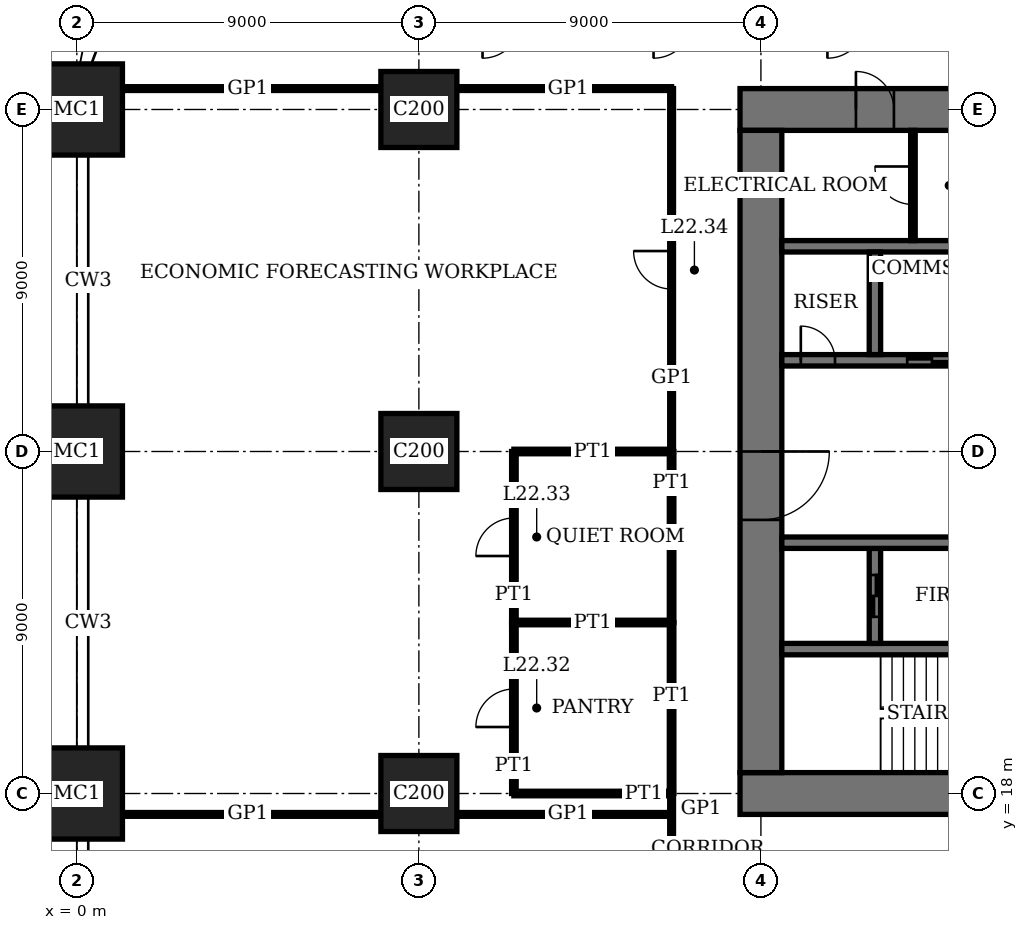
"""IFC4 building model, lengths in metres.
Left out: names, types, materials, properties, quantities, classifications, styles, units other than length and angle.
Written with IfcOpenShell. Run it as: python <this file> out.ifc"""

import sys

from ifc_helpers import new_model, si_unit, direction, frame, frame_2d, origin, origin_2d, place, context, subcontext, project, spatial, rectangle, extrude, element, fill, save


model = new_model("IFC4")
c1 = context("Model", 3, precision=1e-05, world=origin(), true_north=direction((0.0, 1.0)))
c2 = subcontext(c1, "Body", "Model", "MODEL_VIEW")
j1 = project(units=[si_unit("LENGTHUNIT", "METRE"), si_unit("PLANEANGLEUNIT", "RADIAN")], contexts=[c1])
p1 = place(None, origin())
s1 = spatial("IfcSite", under=j1, at=p1, CompositionType="ELEMENT")
p2 = place(p1, origin())
s2 = spatial("IfcBuilding", under=s1, at=p2, CompositionType="ELEMENT")
p3 = place(p2, frame((0.0, 0.0, 93.0)))
s3 = spatial("IfcBuildingStorey", under=s2, at=p3, CompositionType="ELEMENT", Elevation=93.0)
for number, where, z_axis, x_axis in (
    (1, (0.0, 18.0, 0.0), (0.0, 0.0, 1.0), (1.0, 0.0, 0.0)),
    (2, (0.0, 27.0, 0.0), (0.0, 0.0, 1.0), (1.0, 0.0, 0.0)),
    (3, (0.0, 36.0, 0.0), (0.0, 0.0, 1.0), (1.0, 0.0, 0.0)),
):
    element("IfcColumn", number, at=place(p3, frame(where, z_axis=z_axis, x_axis=x_axis)), inside=s3, PredefinedType="COLUMN", context=c2, shape_type="SweptSolid", body=[
        extrude(rectangle(XDim=2.4, YDim=2.4, at=origin_2d()), origin(), (0.0, 0.0, 1.0), 4.0),
    ])
for number, where, z_axis, x_axis in (
    (4, (9.0, 18.0, 0.0), (0.0, 0.0, 1.0), (1.0, 0.0, 0.0)),
    (5, (9.0, 27.0, 0.0), (0.0, 0.0, 1.0), (1.0, 0.0, 0.0)),
    (6, (9.0, 36.0, 0.0), (0.0, 0.0, 1.0), (1.0, 0.0, 0.0)),
):
    element("IfcColumn", number, at=place(p3, frame(where, z_axis=z_axis, x_axis=x_axis)), inside=s3, PredefinedType="COLUMN", context=c2, shape_type="SweptSolid", body=[
        extrude(rectangle(XDim=2.0, YDim=2.0, at=origin_2d()), origin(), (0.0, 0.0, 1.0), 4.0),
    ])
p4 = place(p3, frame((17.45, 18.0, 0.0), z_axis=(0.0, 0.0, 1.0), x_axis=(1.0, 0.0, 0.0)))
e7 = element("IfcWall", 7, at=p4, inside=s3, PredefinedType="SHEAR", context=c2, shape_type="SweptSolid", body=[
    extrude(rectangle(XDim=28.1, YDim=1.1, at=frame_2d((14.05, 0.0))), origin(), (0.0, 0.0, 1.0), 4.0),
])
p5 = place(p4, frame((11.55, 0.0, 0.0)))
e8 = element("IfcOpeningElement", 8, at=p5, cuts=e7, PredefinedType="OPENING", context=c2, shape_type="SweptSolid", body=[
    extrude(rectangle(XDim=1.0, YDim=2.4, at=frame_2d((0.5, 1.2))), frame((0.0, 0.56, 0.0), z_axis=(0.0, -1.0, 0.0), x_axis=(1.0, 0.0, 0.0)), (0.0, 0.0, 1.0), 1.12),
])
p6 = place(p4, frame((16.55, 0.0, 0.0)))
e9 = element("IfcOpeningElement", 9, at=p6, cuts=e7, PredefinedType="OPENING", context=c2, shape_type="SweptSolid", body=[
    extrude(rectangle(XDim=1.0, YDim=2.4, at=frame_2d((0.5, 1.2))), frame((0.0, 0.56, 0.0), z_axis=(0.0, -1.0, 0.0), x_axis=(1.0, 0.0, 0.0)), (0.0, 0.0, 1.0), 1.12),
])
p7 = place(p4, frame((20.0, 0.0, 0.0)))
e10 = element("IfcOpeningElement", 10, at=p7, cuts=e7, PredefinedType="OPENING", context=c2, shape_type="SweptSolid", body=[
    extrude(rectangle(XDim=1.1, YDim=2.4, at=frame_2d((0.55, 1.2))), frame((0.0, 0.56, 0.0), z_axis=(0.0, -1.0, 0.0), x_axis=(1.0, 0.0, 0.0)), (0.0, 0.0, 1.0), 1.12),
])
p8 = place(p4, frame((24.05, 0.0, 0.0)))
e11 = element("IfcOpeningElement", 11, at=p8, cuts=e7, PredefinedType="OPENING", context=c2, shape_type="SweptSolid", body=[
    extrude(rectangle(XDim=1.0, YDim=2.4, at=frame_2d((0.5, 1.2))), frame((0.0, 0.56, 0.0), z_axis=(0.0, -1.0, 0.0), x_axis=(1.0, 0.0, 0.0)), (0.0, 0.0, 1.0), 1.12),
])
p9 = place(p3, frame((45.55, 36.0, 0.0), z_axis=(0.0, 0.0, 1.0), x_axis=(-1.0, 0.0, 0.0)))
e12 = element("IfcWall", 12, at=p9, inside=s3, PredefinedType="SHEAR", context=c2, shape_type="SweptSolid", body=[
    extrude(rectangle(XDim=28.1, YDim=1.1, at=frame_2d((14.05, 0.0))), origin(), (0.0, 0.0, 1.0), 4.0),
])
p10 = place(p9, frame((11.55, 0.0, 0.0)))
e13 = element("IfcOpeningElement", 13, at=p10, cuts=e12, PredefinedType="OPENING", context=c2, shape_type="SweptSolid", body=[
    extrude(rectangle(XDim=1.0, YDim=2.4, at=frame_2d((0.5, 1.2))), frame((0.0, 0.56, 0.0), z_axis=(0.0, -1.0, 0.0), x_axis=(1.0, 0.0, 0.0)), (0.0, 0.0, 1.0), 1.12),
])
p11 = place(p9, frame((16.55, 0.0, 0.0)))
e14 = element("IfcOpeningElement", 14, at=p11, cuts=e12, PredefinedType="OPENING", context=c2, shape_type="SweptSolid", body=[
    extrude(rectangle(XDim=1.0, YDim=2.4, at=frame_2d((0.5, 1.2))), frame((0.0, 0.56, 0.0), z_axis=(0.0, -1.0, 0.0), x_axis=(1.0, 0.0, 0.0)), (0.0, 0.0, 1.0), 1.12),
])
p12 = place(p9, frame((20.0, 0.0, 0.0)))
e15 = element("IfcOpeningElement", 15, at=p12, cuts=e12, PredefinedType="OPENING", context=c2, shape_type="SweptSolid", body=[
    extrude(rectangle(XDim=1.1, YDim=2.4, at=frame_2d((0.55, 1.2))), frame((0.0, 0.56, 0.0), z_axis=(0.0, -1.0, 0.0), x_axis=(1.0, 0.0, 0.0)), (0.0, 0.0, 1.0), 1.12),
])
p13 = place(p9, frame((24.05, 0.0, 0.0)))
e16 = element("IfcOpeningElement", 16, at=p13, cuts=e12, PredefinedType="OPENING", context=c2, shape_type="SweptSolid", body=[
    extrude(rectangle(XDim=1.0, YDim=2.4, at=frame_2d((0.5, 1.2))), frame((0.0, 0.56, 0.0), z_axis=(0.0, -1.0, 0.0), x_axis=(1.0, 0.0, 0.0)), (0.0, 0.0, 1.0), 1.12),
])
p14 = place(p3, frame((18.0, 35.45, 0.0), z_axis=(0.0, 0.0, 1.0), x_axis=(0.0, -1.0, 0.0)))
e17 = element("IfcWall", 17, at=p14, inside=s3, PredefinedType="SHEAR", context=c2, shape_type="SweptSolid", body=[
    extrude(rectangle(XDim=16.9, YDim=1.1, at=frame_2d((8.45, 0.0))), origin(), (0.0, 0.0, 1.0), 4.0),
])
p15 = place(p14, frame((8.45, 0.0, 0.0)))
e18 = element("IfcOpeningElement", 18, at=p15, cuts=e17, PredefinedType="OPENING", context=c2, shape_type="SweptSolid", body=[
    extrude(rectangle(XDim=1.8, YDim=2.4, at=frame_2d((0.9, 1.2))), frame((0.0, 0.56, 0.0), z_axis=(0.0, -1.0, 0.0), x_axis=(1.0, 0.0, 0.0)), (0.0, 0.0, 1.0), 1.12),
])
p16 = place(p3, frame((18.55, 21.8, 0.0), z_axis=(0.0, 0.0, 1.0), x_axis=(1.0, 0.0, 0.0)))
e19 = element("IfcWall", 19, at=p16, inside=s3, PredefinedType="SHEAR", context=c2, shape_type="SweptSolid", body=[
    extrude(rectangle(XDim=8.3, YDim=0.3, at=frame_2d((4.15, 0.0))), origin(), (0.0, 0.0, 1.0), 4.0),
])
p17 = place(p16, frame((6.85, 0.0, 0.0)))
e20 = element("IfcOpeningElement", 20, at=p17, cuts=e19, PredefinedType="OPENING", context=c2, shape_type="SweptSolid", body=[
    extrude(rectangle(XDim=1.0, YDim=2.4, at=frame_2d((0.5, 1.2))), frame((0.0, 0.16, 0.0), z_axis=(0.0, -1.0, 0.0), x_axis=(1.0, 0.0, 0.0)), (0.0, 0.0, 1.0), 0.32),
])
p18 = place(p3, frame((21.0, 21.95, 0.0), z_axis=(0.0, 0.0, 1.0), x_axis=(0.0, 1.0, 0.0)))
e21 = element("IfcWall", 21, at=p18, inside=s3, PredefinedType="SHEAR", context=c2, shape_type="SweptSolid", body=[
    extrude(rectangle(XDim=2.5, YDim=0.3, at=frame_2d((1.25, 0.0))), origin(), (0.0, 0.0, 1.0), 4.0),
])
p19 = place(p18, frame((0.7, 0.0, 0.0)))
e22 = element("IfcOpeningElement", 22, at=p19, cuts=e21, PredefinedType="OPENING", context=c2, shape_type="SweptSolid", body=[
    extrude(rectangle(XDim=1.1, YDim=2.4, at=frame_2d((0.55, 1.2))), frame((0.0, 0.16, 0.0), z_axis=(0.0, -1.0, 0.0), x_axis=(1.0, 0.0, 0.0)), (0.0, 0.0, 1.0), 0.32),
])
p20 = place(p3, frame((18.55, 24.6, 0.0), z_axis=(0.0, 0.0, 1.0), x_axis=(1.0, 0.0, 0.0)))
e23 = element("IfcWall", 23, at=p20, inside=s3, PredefinedType="SHEAR", context=c2, shape_type="SweptSolid", body=[
    extrude(rectangle(XDim=25.9, YDim=0.3, at=frame_2d((12.95, 0.0))), origin(), (0.0, 0.0, 1.0), 4.0),
])
p21 = place(p20, frame((4.95, 0.0, 0.0)))
e24 = element("IfcOpeningElement", 24, at=p21, cuts=e23, PredefinedType="OPENING", context=c2, shape_type="SweptSolid", body=[
    extrude(rectangle(XDim=1.0, YDim=2.4, at=frame_2d((0.5, 1.2))), frame((0.0, 0.16, 0.0), z_axis=(0.0, -1.0, 0.0), x_axis=(1.0, 0.0, 0.0)), (0.0, 0.0, 1.0), 0.32),
])
p22 = place(p20, frame((24.5, 0.0, 0.0)))
e25 = element("IfcOpeningElement", 25, at=p22, cuts=e23, PredefinedType="OPENING", context=c2, shape_type="SweptSolid", body=[
    extrude(rectangle(XDim=0.9, YDim=2.1, at=frame_2d((0.45, 1.05))), frame((0.0, 0.16, 0.0), z_axis=(0.0, -1.0, 0.0), x_axis=(1.0, 0.0, 0.0)), (0.0, 0.0, 1.0), 0.32),
])
p23 = place(p20, frame((21.3, 0.0, 0.0)))
e26 = element("IfcOpeningElement", 26, at=p23, cuts=e23, PredefinedType="OPENING", context=c2, shape_type="SweptSolid", body=[
    extrude(rectangle(XDim=1.3, YDim=2.4, at=frame_2d((0.65, 1.2))), frame((0.0, 0.16, 0.0), z_axis=(0.0, -1.0, 0.0), x_axis=(1.0, 0.0, 0.0)), (0.0, 0.0, 1.0), 0.32),
])
p24 = place(p3, frame((18.55, 29.4, 0.0), z_axis=(0.0, 0.0, 1.0), x_axis=(1.0, 0.0, 0.0)))
e27 = element("IfcWall", 27, at=p24, inside=s3, PredefinedType="SHEAR", context=c2, shape_type="SweptSolid", body=[
    extrude(rectangle(XDim=25.9, YDim=0.3, at=frame_2d((12.95, 0.0))), origin(), (0.0, 0.0, 1.0), 4.0),
])
p25 = place(p24, frame((19.95, 0.0, 0.0)))
e28 = element("IfcOpeningElement", 28, at=p25, cuts=e27, PredefinedType="OPENING", context=c2, shape_type="SweptSolid", body=[
    extrude(rectangle(XDim=1.0, YDim=2.4, at=frame_2d((0.5, 1.2))), frame((0.0, 0.16, 0.0), z_axis=(0.0, -1.0, 0.0), x_axis=(1.0, 0.0, 0.0)), (0.0, 0.0, 1.0), 0.32),
])
p26 = place(p24, frame((0.5, 0.0, 0.0)))
e29 = element("IfcOpeningElement", 29, at=p26, cuts=e27, PredefinedType="OPENING", context=c2, shape_type="SweptSolid", body=[
    extrude(rectangle(XDim=0.9, YDim=2.1, at=frame_2d((0.45, 1.05))), frame((0.0, 0.16, 0.0), z_axis=(0.0, -1.0, 0.0), x_axis=(1.0, 0.0, 0.0)), (0.0, 0.0, 1.0), 0.32),
])
p27 = place(p24, frame((15.4, 0.0, 0.0)))
e30 = element("IfcOpeningElement", 30, at=p27, cuts=e27, PredefinedType="OPENING", context=c2, shape_type="SweptSolid", body=[
    extrude(rectangle(XDim=1.1, YDim=2.4, at=frame_2d((0.55, 1.2))), frame((0.0, 0.16, 0.0), z_axis=(0.0, -1.0, 0.0), x_axis=(1.0, 0.0, 0.0)), (0.0, 0.0, 1.0), 0.32),
])
p28 = place(p24, frame((12.4, 0.0, 0.0)))
e31 = element("IfcOpeningElement", 31, at=p28, cuts=e27, PredefinedType="OPENING", context=c2, shape_type="SweptSolid", body=[
    extrude(rectangle(XDim=1.1, YDim=2.4, at=frame_2d((0.55, 1.2))), frame((0.0, 0.16, 0.0), z_axis=(0.0, -1.0, 0.0), x_axis=(1.0, 0.0, 0.0)), (0.0, 0.0, 1.0), 0.32),
])
p29 = place(p24, frame((3.3, 0.0, 0.0)))
e32 = element("IfcOpeningElement", 32, at=p29, cuts=e27, PredefinedType="OPENING", context=c2, shape_type="SweptSolid", body=[
    extrude(rectangle(XDim=1.3, YDim=2.4, at=frame_2d((0.65, 1.2))), frame((0.0, 0.16, 0.0), z_axis=(0.0, -1.0, 0.0), x_axis=(1.0, 0.0, 0.0)), (0.0, 0.0, 1.0), 0.32),
])
p30 = place(p3, frame((18.55, 32.4, 0.0), z_axis=(0.0, 0.0, 1.0), x_axis=(1.0, 0.0, 0.0)))
e33 = element("IfcWall", 33, at=p30, inside=s3, PredefinedType="SHEAR", context=c2, shape_type="SweptSolid", body=[
    extrude(rectangle(XDim=17.3, YDim=0.3, at=frame_2d((8.65, 0.0))), origin(), (0.0, 0.0, 1.0), 4.0),
])
p31 = place(p3, frame((21.0, 29.55, 0.0), z_axis=(0.0, 0.0, 1.0), x_axis=(0.0, 1.0, 0.0)))
e34 = element("IfcWall", 34, at=p31, inside=s3, PredefinedType="SHEAR", context=c2, shape_type="SweptSolid", body=[
    extrude(rectangle(XDim=2.7, YDim=0.3, at=frame_2d((1.35, 0.0))), origin(), (0.0, 0.0, 1.0), 4.0),
])
p32 = place(p3, frame((1.2, 17.45, 0.0), z_axis=(0.0, 0.0, 1.0), x_axis=(1.0, 0.0, 0.0)))
e35 = element("IfcWall", 35, at=p32, inside=s3, PredefinedType="PARTITIONING", context=c2, shape_type="SweptSolid", body=[
    extrude(rectangle(XDim=6.8, YDim=0.1, at=frame_2d((3.4, 0.0))), origin(), (0.0, 0.0, 1.0), 3.75),
])
p33 = place(p3, frame((10.0, 17.45, 0.0), z_axis=(0.0, 0.0, 1.0), x_axis=(1.0, 0.0, 0.0)))
e36 = element("IfcWall", 36, at=p33, inside=s3, PredefinedType="PARTITIONING", context=c2, shape_type="SweptSolid", body=[
    extrude(rectangle(XDim=5.65, YDim=0.1, at=frame_2d((2.825, 0.0))), origin(), (0.0, 0.0, 1.0), 3.75),
])
p34 = place(p3, frame((11.5, 18.0, 0.0), z_axis=(0.0, 0.0, 1.0), x_axis=(1.0, 0.0, 0.0)))
e37 = element("IfcWall", 37, at=p34, inside=s3, PredefinedType="PARTITIONING", context=c2, shape_type="SweptSolid", body=[
    extrude(rectangle(XDim=4.15, YDim=0.12, at=frame_2d((2.075, 0.0))), origin(), (0.0, 0.0, 1.0), 3.05),
])
p35 = place(p3, frame((11.5, 22.5, 0.0), z_axis=(0.0, 0.0, 1.0), x_axis=(1.0, 0.0, 0.0)))
e38 = element("IfcWall", 38, at=p35, inside=s3, PredefinedType="PARTITIONING", context=c2, shape_type="SweptSolid", body=[
    extrude(rectangle(XDim=4.15, YDim=0.12, at=frame_2d((2.075, 0.0))), origin(), (0.0, 0.0, 1.0), 3.1),
])
p36 = place(p3, frame((11.5, 27.0, 0.0), z_axis=(0.0, 0.0, 1.0), x_axis=(1.0, 0.0, 0.0)))
e39 = element("IfcWall", 39, at=p36, inside=s3, PredefinedType="PARTITIONING", context=c2, shape_type="SweptSolid", body=[
    extrude(rectangle(XDim=4.15, YDim=0.12, at=frame_2d((2.075, 0.0))), origin(), (0.0, 0.0, 1.0), 3.05),
])
p37 = place(p3, frame((1.2, 36.55, 0.0), z_axis=(0.0, 0.0, 1.0), x_axis=(1.0, 0.0, 0.0)))
e40 = element("IfcWall", 40, at=p37, inside=s3, PredefinedType="PARTITIONING", context=c2, shape_type="SweptSolid", body=[
    extrude(rectangle(XDim=6.8, YDim=0.1, at=frame_2d((3.4, 0.0))), origin(), (0.0, 0.0, 1.0), 3.75),
])
p38 = place(p3, frame((10.0, 36.55, 0.0), z_axis=(0.0, 0.0, 1.0), x_axis=(1.0, 0.0, 0.0)))
e41 = element("IfcWall", 41, at=p38, inside=s3, PredefinedType="PARTITIONING", context=c2, shape_type="SweptSolid", body=[
    extrude(rectangle(XDim=5.65, YDim=0.1, at=frame_2d((2.825, 0.0))), origin(), (0.0, 0.0, 1.0), 3.75),
])
p39 = place(p3, frame((11.5, 18.0, 0.0), z_axis=(0.0, 0.0, 1.0), x_axis=(0.0, 1.0, 0.0)))
e42 = element("IfcWall", 42, at=p39, inside=s3, PredefinedType="PARTITIONING", context=c2, shape_type="SweptSolid", body=[
    extrude(rectangle(XDim=4.5, YDim=0.12, at=frame_2d((2.25, 0.0))), origin(), (0.0, 0.0, 1.0), 3.75),
])
p40 = place(p39, frame((1.75, 0.0, 0.0)))
e43 = element("IfcOpeningElement", 43, at=p40, cuts=e42, PredefinedType="OPENING", context=c2, shape_type="SweptSolid", body=[
    extrude(rectangle(XDim=1.0, YDim=2.4, at=frame_2d((0.5, 1.2))), frame((0.0, 0.07, 0.0), z_axis=(0.0, -1.0, 0.0), x_axis=(1.0, 0.0, 0.0)), (0.0, 0.0, 1.0), 0.14),
])
p41 = place(p3, frame((11.5, 22.5, 0.0), z_axis=(0.0, 0.0, 1.0), x_axis=(0.0, 1.0, 0.0)))
e44 = element("IfcWall", 44, at=p41, inside=s3, PredefinedType="PARTITIONING", context=c2, shape_type="SweptSolid", body=[
    extrude(rectangle(XDim=4.5, YDim=0.12, at=frame_2d((2.25, 0.0))), origin(), (0.0, 0.0, 1.0), 3.75),
])
p42 = place(p41, frame((1.75, 0.0, 0.0)))
e45 = element("IfcOpeningElement", 45, at=p42, cuts=e44, PredefinedType="OPENING", context=c2, shape_type="SweptSolid", body=[
    extrude(rectangle(XDim=1.0, YDim=2.4, at=frame_2d((0.5, 1.2))), frame((0.0, 0.07, 0.0), z_axis=(0.0, -1.0, 0.0), x_axis=(1.0, 0.0, 0.0)), (0.0, 0.0, 1.0), 0.14),
])
for number, where, z_axis, x_axis in (
    (46, (15.65, 18.0, 0.0), (0.0, 0.0, 1.0), (0.0, 1.0, 0.0)),
    (47, (15.65, 22.5, 0.0), (0.0, 0.0, 1.0), (0.0, 1.0, 0.0)),
):
    element("IfcWall", number, at=place(p3, frame(where, z_axis=z_axis, x_axis=x_axis)), inside=s3, PredefinedType="PARTITIONING", context=c2, shape_type="SweptSolid", body=[
        extrude(rectangle(XDim=4.5, YDim=0.12, at=frame_2d((2.25, 0.0))), origin(), (0.0, 0.0, 1.0), 3.75),
    ])
p43 = place(p3, frame((15.65, 15.65, 0.0), z_axis=(0.0, 0.0, 1.0), x_axis=(0.0, 1.0, 0.0)))
e48 = element("IfcWall", 48, at=p43, inside=s3, PredefinedType="PARTITIONING", context=c2, shape_type="SweptSolid", body=[
    extrude(rectangle(XDim=2.35, YDim=0.1, at=frame_2d((1.175, 0.0))), origin(), (0.0, 0.0, 1.0), 3.75),
])
p44 = place(p3, frame((15.65, 27.0, 0.0), z_axis=(0.0, 0.0, 1.0), x_axis=(0.0, 1.0, 0.0)))
e49 = element("IfcWall", 49, at=p44, inside=s3, PredefinedType="PARTITIONING", context=c2, shape_type="SweptSolid", body=[
    extrude(rectangle(XDim=9.55, YDim=0.1, at=frame_2d((4.775, 0.0))), origin(), (0.0, 0.0, 1.0), 3.75),
])
p45 = place(p44, frame((4.275, 0.0, 0.0)))
e50 = element("IfcOpeningElement", 50, at=p45, cuts=e49, PredefinedType="OPENING", context=c2, shape_type="SweptSolid", body=[
    extrude(rectangle(XDim=1.0, YDim=2.4, at=frame_2d((0.5, 1.2))), frame((0.0, 0.06, 0.0), z_axis=(0.0, -1.0, 0.0), x_axis=(1.0, 0.0, 0.0)), (0.0, 0.0, 1.0), 0.12),
])
p46 = place(p3, frame((22.0, 32.55, 0.0), z_axis=(0.0, 0.0, 1.0), x_axis=(0.0, 1.0, 0.0)))
e51 = element("IfcWall", 51, at=p46, inside=s3, PredefinedType="PARTITIONING", context=c2, shape_type="SweptSolid", body=[
    extrude(rectangle(XDim=2.9, YDim=0.12, at=frame_2d((1.45, 0.0))), origin(), (0.0, 0.0, 1.0), 3.75),
])
p47 = place(p46, frame((0.95, 0.0, 0.0)))
e52 = element("IfcOpeningElement", 52, at=p47, cuts=e51, PredefinedType="OPENING", context=c2, shape_type="SweptSolid", body=[
    extrude(rectangle(XDim=1.0, YDim=2.4, at=frame_2d((0.5, 1.2))), frame((0.0, 0.07, 0.0), z_axis=(0.0, -1.0, 0.0), x_axis=(1.0, 0.0, 0.0)), (0.0, 0.0, 1.0), 0.14),
])
p48 = place(p15, origin())
e53 = element("IfcDoor", 53, at=p48, inside=s3, OperationType="DOUBLE_DOOR_DOUBLE_SWING", PredefinedType="DOOR", context=c2, shape_type="SweptSolid", body=[
    extrude(rectangle(XDim=1.8, YDim=2.4, at=frame_2d((0.9, 1.2))), frame((0.0, 0.03, 0.0), z_axis=(0.0, -1.0, 0.0), x_axis=(1.0, 0.0, 0.0)), (0.0, 0.0, 1.0), 0.06),
    extrude(rectangle(XDim=0.04, YDim=2.4, at=frame_2d((0.02, 1.2))), frame((0.0, 0.55, 0.0), z_axis=(0.0, -1.0, 0.0), x_axis=(1.0, 0.0, 0.0)), (0.0, 0.0, 1.0), 1.1),
    extrude(rectangle(XDim=0.04, YDim=2.4, at=frame_2d((1.78, 1.2))), frame((0.0, 0.55, 0.0), z_axis=(0.0, -1.0, 0.0), x_axis=(1.0, 0.0, 0.0)), (0.0, 0.0, 1.0), 1.1),
    extrude(rectangle(XDim=1.8, YDim=0.04, at=frame_2d((0.9, 2.38))), frame((0.0, 0.55, 0.0), z_axis=(0.0, -1.0, 0.0), x_axis=(1.0, 0.0, 0.0)), (0.0, 0.0, 1.0), 1.1),
])
fill(e18, e53)
p49 = place(p13, origin())
e54 = element("IfcDoor", 54, at=p49, inside=s3, OperationType="SINGLE_SWING_RIGHT", PredefinedType="DOOR", context=c2, shape_type="SweptSolid", body=[
    extrude(rectangle(XDim=1.0, YDim=2.4, at=frame_2d((0.5, 1.2))), frame((0.0, 0.025, 0.0), z_axis=(0.0, -1.0, 0.0), x_axis=(1.0, 0.0, 0.0)), (0.0, 0.0, 1.0), 0.05),
    extrude(rectangle(XDim=0.04, YDim=2.4, at=frame_2d((0.02, 1.2))), frame((0.0, 0.4, 0.0), z_axis=(0.0, -1.0, 0.0), x_axis=(1.0, 0.0, 0.0)), (0.0, 0.0, 1.0), 0.8),
    extrude(rectangle(XDim=0.04, YDim=2.4, at=frame_2d((0.98, 1.2))), frame((0.0, 0.4, 0.0), z_axis=(0.0, -1.0, 0.0), x_axis=(1.0, 0.0, 0.0)), (0.0, 0.0, 1.0), 0.8),
    extrude(rectangle(XDim=1.0, YDim=0.04, at=frame_2d((0.5, 2.38))), frame((0.0, 0.4, 0.0), z_axis=(0.0, -1.0, 0.0), x_axis=(1.0, 0.0, 0.0)), (0.0, 0.0, 1.0), 0.8),
])
fill(e16, e54)
p50 = place(p26, origin())
e55 = element("IfcDoor", 55, at=p50, inside=s3, OperationType="SINGLE_SWING_RIGHT", PredefinedType="DOOR", context=c2, shape_type="SweptSolid", body=[
    extrude(rectangle(XDim=0.9, YDim=2.1, at=frame_2d((0.45, 1.05))), frame((0.0, 0.03, 0.0), z_axis=(0.0, -1.0, 0.0), x_axis=(1.0, 0.0, 0.0)), (0.0, 0.0, 1.0), 0.06),
])
fill(e29, e55)
p51 = place(p40, origin())
e56 = element("IfcDoor", 56, at=p51, inside=s3, OperationType="SINGLE_SWING_RIGHT", PredefinedType="DOOR", context=c2, shape_type="SweptSolid", body=[
    extrude(rectangle(XDim=1.0, YDim=2.4, at=frame_2d((0.5, 1.2))), frame((0.0, 0.025, 0.0), z_axis=(0.0, -1.0, 0.0), x_axis=(1.0, 0.0, 0.0)), (0.0, 0.0, 1.0), 0.05),
])
fill(e43, e56)
p52 = place(p42, origin())
e57 = element("IfcDoor", 57, at=p52, inside=s3, OperationType="SINGLE_SWING_RIGHT", PredefinedType="DOOR", context=c2, shape_type="SweptSolid", body=[
    extrude(rectangle(XDim=1.0, YDim=2.4, at=frame_2d((0.5, 1.2))), frame((0.0, 0.025, 0.0), z_axis=(0.0, -1.0, 0.0), x_axis=(1.0, 0.0, 0.0)), (0.0, 0.0, 1.0), 0.05),
])
fill(e45, e57)
p53 = place(p45, origin())
e58 = element("IfcDoor", 58, at=p53, inside=s3, OperationType="SINGLE_SWING_LEFT", PredefinedType="DOOR", context=c2, shape_type="SweptSolid", body=[
    extrude(rectangle(XDim=1.0, YDim=2.4, at=frame_2d((0.5, 1.2))), frame((0.0, 0.02, 0.0), z_axis=(0.0, -1.0, 0.0), x_axis=(1.0, 0.0, 0.0)), (0.0, 0.0, 1.0), 0.04),
])
fill(e50, e58)
p54 = place(p47, origin())
e59 = element("IfcDoor", 59, at=p54, inside=s3, OperationType="SINGLE_SWING_LEFT", PredefinedType="DOOR", context=c2, shape_type="SweptSolid", body=[
    extrude(rectangle(XDim=1.0, YDim=2.4, at=frame_2d((0.5, 1.2))), frame((0.0, 0.03, 0.0), z_axis=(0.0, -1.0, 0.0), x_axis=(1.0, 0.0, 0.0)), (0.0, 0.0, 1.0), 0.06),
])
fill(e52, e59)
p55 = place(p29, origin())
e60 = element("IfcDoor", 60, at=p55, inside=s3, OperationType="DOUBLE_DOOR_SLIDING", PredefinedType="DOOR", context=c2, shape_type="SweptSolid", body=[
    extrude(rectangle(XDim=1.3, YDim=2.4, at=frame_2d((0.65, 1.2))), frame((0.0, 0.02, 0.0), z_axis=(0.0, -1.0, 0.0), x_axis=(1.0, 0.0, 0.0)), (0.0, 0.0, 1.0), 0.04),
])
fill(e32, e60)
p56 = place(p19, origin())
e61 = element("IfcDoor", 61, at=p56, inside=s3, OperationType="DOUBLE_DOOR_SLIDING", PredefinedType="DOOR", context=c2, shape_type="SweptSolid", body=[
    extrude(rectangle(XDim=1.1, YDim=2.4, at=frame_2d((0.55, 1.2))), frame((0.0, 0.03, 0.0), z_axis=(0.0, -1.0, 0.0), x_axis=(1.0, 0.0, 0.0)), (0.0, 0.0, 1.0), 0.06),
])
fill(e22, e61)
save(model, sys.argv[1])
